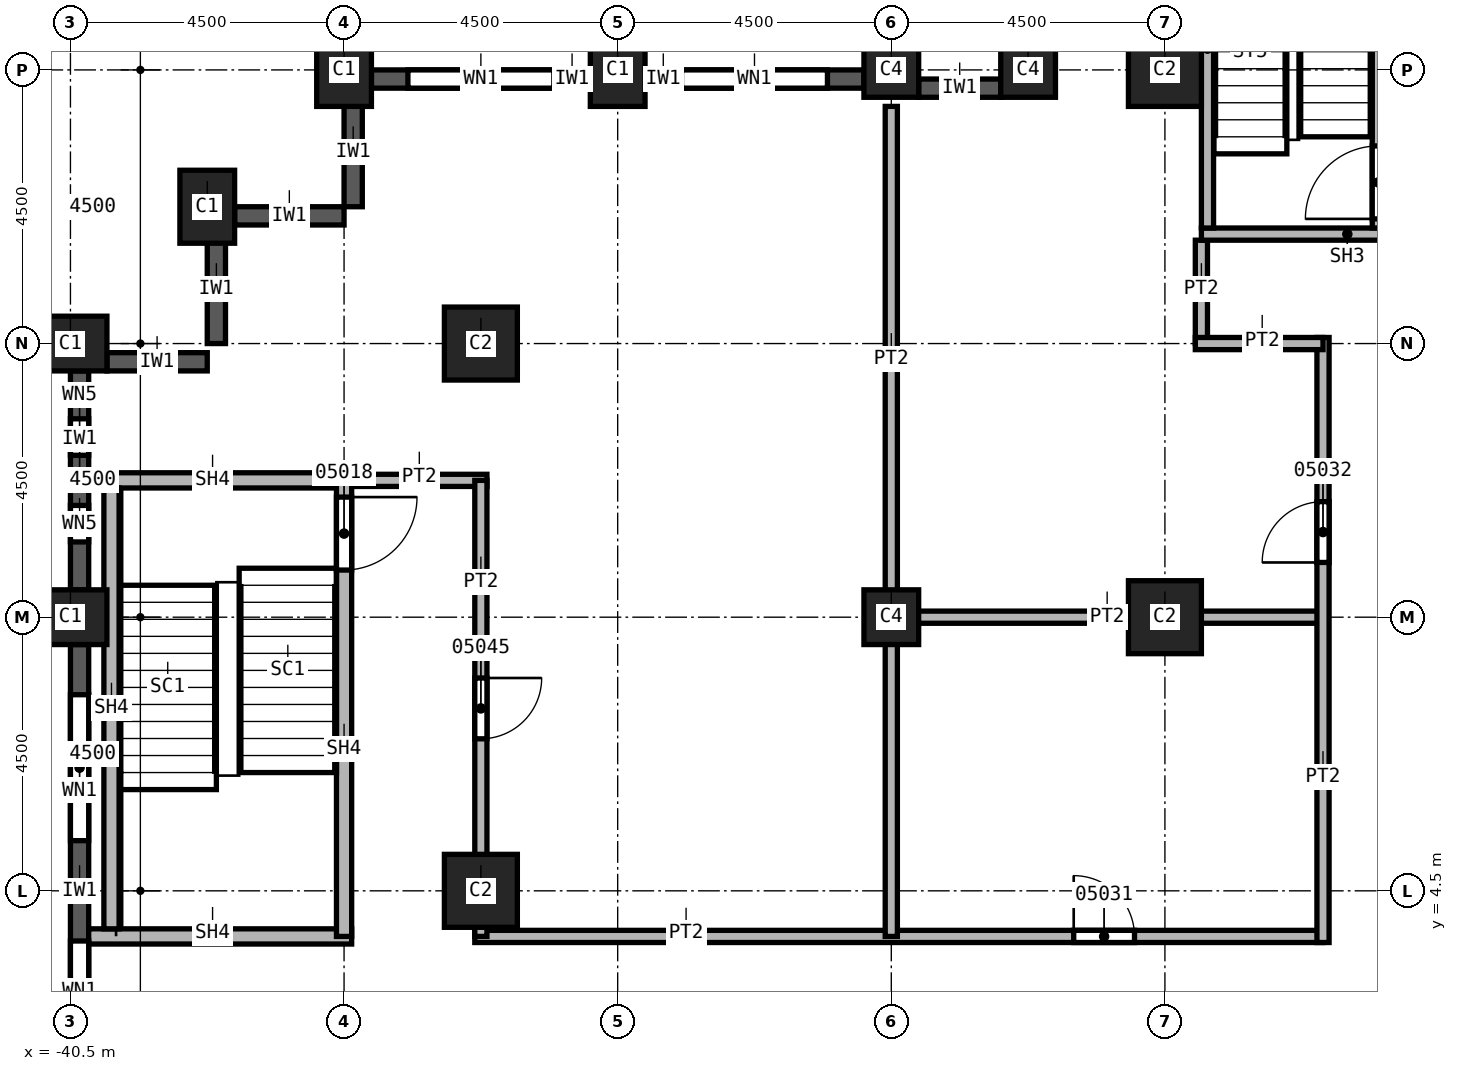
"""IFC4 building model, lengths in metres.
Left out: names, types, materials, properties, quantities, classifications, styles, units other than length and angle.
Written with IfcOpenShell. Run it as: python <this file> out.ifc"""

import sys

from ifc_helpers import new_model, si_unit, direction, frame, frame_2d, origin, origin_2d, place, context, subcontext, project, spatial, rectangle, extrude, element, fill, save


model = new_model("IFC4")
c1 = context("Model", 3, precision=1e-05, world=origin(), true_north=direction((0.0, 1.0)))
c2 = subcontext(c1, "Body", "Model", "MODEL_VIEW")
j1 = project(units=[si_unit("LENGTHUNIT", "METRE"), si_unit("PLANEANGLEUNIT", "RADIAN")], contexts=[c1])
p1 = place(None, origin())
s1 = spatial("IfcSite", under=j1, at=p1, CompositionType="ELEMENT")
p2 = place(p1, origin())
s2 = spatial("IfcBuilding", under=s1, at=p2, CompositionType="ELEMENT")
p3 = place(p2, frame((0.0, 0.0, 112.0)))
s3 = spatial("IfcBuildingStorey", under=s2, at=p3, CompositionType="ELEMENT", Elevation=112.0)
for number, where, z_axis, x_axis in (
    (1, (-40.5, 9.0, 0.0), (0.0, 0.0, 1.0), (0.0, 1.0, 0.0)),
    (2, (-40.5, 13.5, 0.0), (0.0, 0.0, 1.0), (0.0, 1.0, 0.0)),
    (3, (-38.25, 15.75, 0.0), (0.0, 0.0, 1.0), (1.0, 0.0, 0.0)),
    (4, (-31.5, 18.0, 0.0), (0.0, 0.0, 1.0), (1.0, 0.0, 0.0)),
    (5, (-36.0, 18.0, 0.0), (0.0, 0.0, 1.0), (1.0, 0.0, 0.0)),
):
    element("IfcColumn", number, at=place(p3, frame(where, z_axis=z_axis, x_axis=x_axis)), inside=s3, PredefinedType="COLUMN", context=c2, shape_type="SweptSolid", body=[
        extrude(rectangle(XDim=0.9, YDim=1.2, at=origin_2d()), origin(), (0.0, 0.0, 1.0), 3.7),
    ])
for number, where, z_axis, x_axis in (
    (6, (-33.75, 4.5, 0.0), (0.0, 0.0, 1.0), (1.0, 0.0, 0.0)),
    (7, (-33.75, 13.5, 0.0), (0.0, 0.0, 1.0), (1.0, 0.0, 0.0)),
    (8, (-22.5, 9.0, 0.0), (0.0, 0.0, 1.0), (1.0, 0.0, 0.0)),
    (9, (-22.5, 18.0, 0.0), (0.0, 0.0, 1.0), (1.0, 0.0, 0.0)),
):
    element("IfcColumn", number, at=place(p3, frame(where, z_axis=z_axis, x_axis=x_axis)), inside=s3, PredefinedType="COLUMN", context=c2, shape_type="SweptSolid", body=[
        extrude(rectangle(XDim=1.2, YDim=1.2, at=origin_2d()), origin(), (0.0, 0.0, 1.0), 3.7),
    ])
for number, where, z_axis, x_axis in (
    (10, (-27.0, 9.0, 0.0), (0.0, 0.0, 1.0), (1.0, 0.0, 0.0)),
    (11, (-27.0, 18.0, 0.0), (0.0, 0.0, 1.0), (1.0, 0.0, 0.0)),
    (12, (-24.75, 18.0, 0.0), (0.0, 0.0, 1.0), (1.0, 0.0, 0.0)),
):
    element("IfcColumn", number, at=place(p3, frame(where, z_axis=z_axis, x_axis=x_axis)), inside=s3, PredefinedType="COLUMN", context=c2, shape_type="SweptSolid", body=[
        extrude(rectangle(XDim=0.9, YDim=0.9, at=origin_2d()), origin(), (0.0, 0.0, 1.0), 3.7),
    ])
for number, where, z_axis, x_axis in (
    (13, (-35.85, 17.55, 0.0), (0.0, 0.0, 1.0), (0.0, -1.0, 0.0)),
    (14, (-37.8, 15.6, 0.0), (0.0, 0.0, 1.0), (1.0, 0.0, 0.0)),
    (15, (-38.1, 15.3, 0.0), (0.0, 0.0, 1.0), (0.0, -1.0, 0.0)),
):
    element("IfcWall", number, at=place(p3, frame(where, z_axis=z_axis, x_axis=x_axis)), inside=s3, PredefinedType="SOLIDWALL", context=c2, shape_type="SweptSolid", body=[
        extrude(rectangle(XDim=1.8, YDim=0.3, at=frame_2d((0.9, 0.0))), origin(), (0.0, 0.0, 1.0), 3.1),
    ])
p4 = place(p3, frame((-39.9, 13.2, 0.0), z_axis=(0.0, 0.0, 1.0), x_axis=(1.0, 0.0, 0.0)))
e16 = element("IfcWall", 16, at=p4, inside=s3, PredefinedType="SOLIDWALL", context=c2, shape_type="SweptSolid", body=[
    extrude(rectangle(XDim=1.65, YDim=0.3, at=frame_2d((0.825, 0.0))), origin(), (0.0, 0.0, 1.0), 3.1),
])
p5 = place(p3, frame((-25.2, 17.7, 0.0), z_axis=(0.0, 0.0, 1.0), x_axis=(-1.0, 0.0, 0.0)))
e17 = element("IfcWall", 17, at=p5, inside=s3, PredefinedType="SOLIDWALL", context=c2, shape_type="SweptSolid", body=[
    extrude(rectangle(XDim=1.35, YDim=0.3, at=frame_2d((0.675, 0.0))), origin(), (0.0, 0.0, 1.0), 3.1),
])
p6 = place(p3, frame((-27.45, 17.85, 0.0), z_axis=(0.0, 0.0, 1.0), x_axis=(-1.0, 0.0, 0.0)))
e18 = element("IfcWall", 18, at=p6, inside=s3, PredefinedType="SOLIDWALL", context=c2, shape_type="SweptSolid", body=[
    extrude(rectangle(XDim=3.6, YDim=0.3, at=frame_2d((1.8, 0.0))), origin(), (0.0, 0.0, 1.0), 3.1),
])
p7 = place(p6, frame((0.6, 0.0, 0.8)))
e19 = element("IfcOpeningElement", 19, at=p7, cuts=e18, PredefinedType="OPENING", context=c2, shape_type="SweptSolid", body=[
    extrude(rectangle(XDim=2.4, YDim=1.95, at=frame_2d((1.2, 0.975))), frame((0.0, 0.15, 0.0), z_axis=(0.0, -1.0, 0.0), x_axis=(1.0, 0.0, 0.0)), (0.0, 0.0, 1.0), 0.3),
])
p8 = place(p3, frame((-31.95, 17.85, 0.0), z_axis=(0.0, 0.0, 1.0), x_axis=(-1.0, 0.0, 0.0)))
e20 = element("IfcWall", 20, at=p8, inside=s3, PredefinedType="SOLIDWALL", context=c2, shape_type="SweptSolid", body=[
    extrude(rectangle(XDim=3.6, YDim=0.3, at=frame_2d((1.8, 0.0))), origin(), (0.0, 0.0, 1.0), 3.1),
])
p9 = place(p8, frame((0.6, 0.0, 0.8)))
e21 = element("IfcOpeningElement", 21, at=p9, cuts=e20, PredefinedType="OPENING", context=c2, shape_type="SweptSolid", body=[
    extrude(rectangle(XDim=2.4, YDim=1.95, at=frame_2d((1.2, 0.975))), frame((0.0, 0.15, 0.0), z_axis=(0.0, -1.0, 0.0), x_axis=(1.0, 0.0, 0.0)), (0.0, 0.0, 1.0), 0.3),
])
p10 = place(p3, frame((-40.35, 13.05, 0.0), z_axis=(0.0, 0.0, 1.0), x_axis=(0.0, -1.0, 0.0)))
e22 = element("IfcWall", 22, at=p10, inside=s3, PredefinedType="SOLIDWALL", context=c2, shape_type="SweptSolid", body=[
    extrude(rectangle(XDim=3.6, YDim=0.3, at=frame_2d((1.8, 0.0))), origin(), (0.0, 0.0, 1.0), 3.1),
])
p11 = place(p10, frame((0.788, 0.0, 0.8)))
e23 = element("IfcOpeningElement", 23, at=p11, cuts=e22, PredefinedType="OPENING", context=c2, shape_type="SweptSolid", body=[
    extrude(rectangle(XDim=0.6, YDim=1.95, at=frame_2d((0.3, 0.975))), frame((0.0, 0.15, 0.0), z_axis=(0.0, -1.0, 0.0), x_axis=(1.0, 0.0, 0.0)), (0.0, 0.0, 1.0), 0.3),
])
p12 = place(p10, frame((2.212, 0.0, 0.8)))
e24 = element("IfcOpeningElement", 24, at=p12, cuts=e22, PredefinedType="OPENING", context=c2, shape_type="SweptSolid", body=[
    extrude(rectangle(XDim=0.6, YDim=1.95, at=frame_2d((0.3, 0.975))), frame((0.0, 0.15, 0.0), z_axis=(0.0, -1.0, 0.0), x_axis=(1.0, 0.0, 0.0)), (0.0, 0.0, 1.0), 0.3),
])
p13 = place(p3, frame((-40.35, 8.55, 0.0), z_axis=(0.0, 0.0, 1.0), x_axis=(0.0, -1.0, 0.0)))
e25 = element("IfcWall", 25, at=p13, inside=s3, PredefinedType="SOLIDWALL", context=c2, shape_type="SweptSolid", body=[
    extrude(rectangle(XDim=8.1, YDim=0.3, at=frame_2d((4.05, 0.0))), origin(), (0.0, 0.0, 1.0), 3.1),
])
p14 = place(p13, frame((0.825, 0.0, 0.8)))
e26 = element("IfcOpeningElement", 26, at=p14, cuts=e25, PredefinedType="OPENING", context=c2, shape_type="SweptSolid", body=[
    extrude(rectangle(XDim=2.4, YDim=1.95, at=frame_2d((1.2, 0.975))), frame((0.0, 0.15, 0.0), z_axis=(0.0, -1.0, 0.0), x_axis=(1.0, 0.0, 0.0)), (0.0, 0.0, 1.0), 0.3),
])
p15 = place(p13, frame((4.875, 0.0, 0.8)))
e27 = element("IfcOpeningElement", 27, at=p15, cuts=e25, PredefinedType="OPENING", context=c2, shape_type="SweptSolid", body=[
    extrude(rectangle(XDim=2.4, YDim=1.95, at=frame_2d((1.2, 0.975))), frame((0.0, 0.15, 0.0), z_axis=(0.0, -1.0, 0.0), x_axis=(1.0, 0.0, 0.0)), (0.0, 0.0, 1.0), 0.3),
])
p16 = place(p3, frame((-36.0, 11.25, 0.0), z_axis=(0.0, 0.0, 1.0), x_axis=(1.0, 0.0, 0.0)))
e28 = element("IfcWall", 28, at=p16, inside=s3, PredefinedType="PARTITIONING", context=c2, shape_type="SweptSolid", body=[
    extrude(rectangle(XDim=2.35, YDim=0.2, at=frame_2d((1.175, 0.0))), origin(), (0.0, 0.0, 1.0), 3.7),
])
p17 = place(p3, frame((-33.85, 3.75, 0.0), z_axis=(0.0, 0.0, 1.0), x_axis=(1.0, 0.0, 0.0)))
e29 = element("IfcWall", 29, at=p17, inside=s3, PredefinedType="PARTITIONING", context=c2, shape_type="SweptSolid", body=[
    extrude(rectangle(XDim=13.95, YDim=0.2, at=frame_2d((6.975, 0.0))), origin(), (0.0, 0.0, 1.0), 3.7),
])
p18 = place(p17, frame((9.85, 0.0, 0.0)))
e30 = element("IfcOpeningElement", 30, at=p18, cuts=e29, PredefinedType="OPENING", context=c2, shape_type="SweptSolid", body=[
    extrude(rectangle(XDim=1.0, YDim=2.1, at=frame_2d((0.5, 1.05))), frame((0.0, 0.1, 0.0), z_axis=(0.0, -1.0, 0.0), x_axis=(1.0, 0.0, 0.0)), (0.0, 0.0, 1.0), 0.2),
])
p19 = place(p3, frame((-33.75, 11.25, 0.0), z_axis=(0.0, 0.0, 1.0), x_axis=(0.0, -1.0, 0.0)))
e31 = element("IfcWall", 31, at=p19, inside=s3, PredefinedType="PARTITIONING", context=c2, shape_type="SweptSolid", body=[
    extrude(rectangle(XDim=7.5, YDim=0.2, at=frame_2d((3.75, 0.0))), origin(), (0.0, 0.0, 1.0), 3.7),
])
p20 = place(p19, frame((3.25, 0.0, 0.0)))
e32 = element("IfcOpeningElement", 32, at=p20, cuts=e31, PredefinedType="OPENING", context=c2, shape_type="SweptSolid", body=[
    extrude(rectangle(XDim=1.0, YDim=2.1, at=frame_2d((0.5, 1.05))), frame((0.0, 0.1, 0.0), z_axis=(0.0, -1.0, 0.0), x_axis=(1.0, 0.0, 0.0)), (0.0, 0.0, 1.0), 0.2),
])
p21 = place(p3, frame((-27.1, 9.0, 0.0), z_axis=(0.0, 0.0, 1.0), x_axis=(1.0, 0.0, 0.0)))
e33 = element("IfcWall", 33, at=p21, inside=s3, PredefinedType="PARTITIONING", context=c2, shape_type="SweptSolid", body=[
    extrude(rectangle(XDim=7.2, YDim=0.2, at=frame_2d((3.6, 0.0))), origin(), (0.0, 0.0, 1.0), 3.7),
])
p22 = place(p3, frame((-27.0, 3.75, 0.0), z_axis=(0.0, 0.0, 1.0), x_axis=(0.0, 1.0, 0.0)))
e34 = element("IfcWall", 34, at=p22, inside=s3, PredefinedType="PARTITIONING", context=c2, shape_type="SweptSolid", body=[
    extrude(rectangle(XDim=13.65, YDim=0.2, at=frame_2d((6.825, 0.0))), origin(), (0.0, 0.0, 1.0), 3.7),
])
p23 = place(p3, frame((-21.9, 13.5, 0.0), z_axis=(0.0, 0.0, 1.0), x_axis=(0.0, 1.0, 0.0)))
e35 = element("IfcWall", 35, at=p23, inside=s3, PredefinedType="PARTITIONING", context=c2, shape_type="SweptSolid", body=[
    extrude(rectangle(XDim=1.7, YDim=0.2, at=frame_2d((0.85, 0.0))), origin(), (0.0, 0.0, 1.0), 3.7),
])
p24 = place(p3, frame((-19.9, 3.65, 0.0), z_axis=(0.0, 0.0, 1.0), x_axis=(0.0, 1.0, 0.0)))
e36 = element("IfcWall", 36, at=p24, inside=s3, PredefinedType="PARTITIONING", context=c2, shape_type="SweptSolid", body=[
    extrude(rectangle(XDim=9.95, YDim=0.2, at=frame_2d((4.975, 0.0))), origin(), (0.0, 0.0, 1.0), 3.7),
])
p25 = place(p24, frame((6.25, 0.0, 0.0)))
e37 = element("IfcOpeningElement", 37, at=p25, cuts=e36, PredefinedType="OPENING", context=c2, shape_type="SweptSolid", body=[
    extrude(rectangle(XDim=1.0, YDim=2.1, at=frame_2d((0.5, 1.05))), frame((0.0, 0.1, 0.0), z_axis=(0.0, -1.0, 0.0), x_axis=(1.0, 0.0, 0.0)), (0.0, 0.0, 1.0), 0.2),
])
p26 = place(p3, frame((-19.9, 13.5, 0.0), z_axis=(0.0, 0.0, 1.0), x_axis=(-1.0, 0.0, 0.0)))
e38 = element("IfcWall", 38, at=p26, inside=s3, PredefinedType="PARTITIONING", context=c2, shape_type="SweptSolid", body=[
    extrude(rectangle(XDim=2.1, YDim=0.2, at=frame_2d((1.05, 0.0))), origin(), (0.0, 0.0, 1.0), 3.7),
])
p27 = place(p3, frame((-40.2, 3.75, 0.0), z_axis=(0.0, 0.0, 1.0), x_axis=(1.0, 0.0, 0.0)))
e39 = element("IfcWall", 39, at=p27, inside=s3, PredefinedType="SOLIDWALL", context=c2, shape_type="SweptSolid", body=[
    extrude(rectangle(XDim=4.325, YDim=0.25, at=frame_2d((2.163, 0.0))), origin(), (0.0, 0.0, 1.0), 3.7),
])
p28 = place(p3, frame((-40.2, 11.25, 0.0), z_axis=(0.0, 0.0, 1.0), x_axis=(1.0, 0.0, 0.0)))
e40 = element("IfcWall", 40, at=p28, inside=s3, PredefinedType="SOLIDWALL", context=c2, shape_type="SweptSolid", body=[
    extrude(rectangle(XDim=4.2, YDim=0.25, at=frame_2d((2.1, 0.0))), origin(), (0.0, 0.0, 1.0), 3.7),
])
p29 = place(p3, frame((-36.0, 11.375, 0.0), z_axis=(0.0, 0.0, 1.0), x_axis=(0.0, -1.0, 0.0)))
e41 = element("IfcWall", 41, at=p29, inside=s3, PredefinedType="SOLIDWALL", context=c2, shape_type="SweptSolid", body=[
    extrude(rectangle(XDim=7.625, YDim=0.25, at=frame_2d((3.812, 0.0))), origin(), (0.0, 0.0, 1.0), 3.7),
])
p30 = place(p29, frame((0.4, 0.0, 0.0)))
e42 = element("IfcOpeningElement", 42, at=p30, cuts=e41, PredefinedType="OPENING", context=c2, shape_type="SweptSolid", body=[
    extrude(rectangle(XDim=1.2, YDim=2.1, at=frame_2d((0.6, 1.05))), frame((0.0, 0.125, 0.0), z_axis=(0.0, -1.0, 0.0), x_axis=(1.0, 0.0, 0.0)), (0.0, 0.0, 1.0), 0.25),
])
p31 = place(p3, frame((-21.9, 15.3, 0.0), z_axis=(0.0, 0.0, 1.0), x_axis=(1.0, 0.0, 0.0)))
e43 = element("IfcWall", 43, at=p31, inside=s3, PredefinedType="SOLIDWALL", context=c2, shape_type="SweptSolid", body=[
    extrude(rectangle(XDim=8.275, YDim=0.2, at=frame_2d((4.137, 0.0))), origin(), (0.0, 0.0, 1.0), 3.7),
])
p32 = place(p31, frame((4.8, 0.0, 0.0)))
e44 = element("IfcOpeningElement", 44, at=p32, cuts=e43, PredefinedType="OPENING", context=c2, shape_type="SweptSolid", body=[
    extrude(rectangle(XDim=1.2, YDim=2.1, at=frame_2d((0.6, 1.05))), frame((0.0, 0.1, 0.0), z_axis=(0.0, -1.0, 0.0), x_axis=(1.0, 0.0, 0.0)), (0.0, 0.0, 1.0), 0.2),
])
p33 = place(p3, frame((-21.8, 15.4, 0.0), z_axis=(0.0, 0.0, 1.0), x_axis=(0.0, 1.0, 0.0)))
e45 = element("IfcWall", 45, at=p33, inside=s3, PredefinedType="SOLIDWALL", context=c2, shape_type="SweptSolid", body=[
    extrude(rectangle(XDim=5.9, YDim=0.2, at=frame_2d((2.95, 0.0))), origin(), (0.0, 0.0, 1.0), 3.7),
])
p34 = place(p3, frame((-18.99, 15.4, 0.0), z_axis=(0.0, 0.0, 1.0), x_axis=(0.0, 1.0, 0.0)))
e46 = element("IfcWall", 46, at=p34, inside=s3, PredefinedType="SOLIDWALL", context=c2, shape_type="SweptSolid", body=[
    extrude(rectangle(XDim=5.9, YDim=0.2, at=frame_2d((2.95, 0.0))), origin(), (0.0, 0.0, 1.0), 3.7),
])
p35 = place(p34, frame((0.15, 0.0, 0.0)))
e47 = element("IfcOpeningElement", 47, at=p35, cuts=e46, PredefinedType="OPENING", context=c2, shape_type="SweptSolid", body=[
    extrude(rectangle(XDim=1.2, YDim=2.1, at=frame_2d((0.6, 1.05))), frame((0.0, 0.1, 0.0), z_axis=(0.0, -1.0, 0.0), x_axis=(1.0, 0.0, 0.0)), (0.0, 0.0, 1.0), 0.2),
])
p36 = place(p3, frame((-39.825, 3.875, 0.0), z_axis=(0.0, 0.0, 1.0), x_axis=(0.0, 1.0, 0.0)))
e48 = element("IfcWall", 48, at=p36, inside=s3, PredefinedType="SOLIDWALL", context=c2, shape_type="SweptSolid", body=[
    extrude(rectangle(XDim=7.25, YDim=0.25, at=frame_2d((3.625, 0.0))), origin(), (0.0, 0.0, 1.0), 3.7),
])
p37 = place(p7, origin())
e49 = element("IfcWindow", 49, at=p37, inside=s3, PartitioningType="SINGLE_PANEL", PredefinedType="WINDOW", context=c2, shape_type="SweptSolid", body=[
    extrude(rectangle(XDim=2.4, YDim=1.95, at=frame_2d((1.2, 0.975))), frame((0.0, 0.03, 0.0), z_axis=(0.0, -1.0, 0.0), x_axis=(1.0, 0.0, 0.0)), (0.0, 0.0, 1.0), 0.06),
])
fill(e19, e49)
p38 = place(p9, origin())
e50 = element("IfcWindow", 50, at=p38, inside=s3, PartitioningType="SINGLE_PANEL", PredefinedType="WINDOW", context=c2, shape_type="SweptSolid", body=[
    extrude(rectangle(XDim=2.4, YDim=1.95, at=frame_2d((1.2, 0.975))), frame((0.0, 0.03, 0.0), z_axis=(0.0, -1.0, 0.0), x_axis=(1.0, 0.0, 0.0)), (0.0, 0.0, 1.0), 0.06),
])
fill(e21, e50)
p39 = place(p14, origin())
e51 = element("IfcWindow", 51, at=p39, inside=s3, PartitioningType="SINGLE_PANEL", PredefinedType="WINDOW", context=c2, shape_type="SweptSolid", body=[
    extrude(rectangle(XDim=2.4, YDim=1.95, at=frame_2d((1.2, 0.975))), frame((0.0, 0.03, 0.0), z_axis=(0.0, -1.0, 0.0), x_axis=(1.0, 0.0, 0.0)), (0.0, 0.0, 1.0), 0.06),
])
fill(e26, e51)
p40 = place(p15, origin())
e52 = element("IfcWindow", 52, at=p40, inside=s3, PartitioningType="SINGLE_PANEL", PredefinedType="WINDOW", context=c2, shape_type="SweptSolid", body=[
    extrude(rectangle(XDim=2.4, YDim=1.95, at=frame_2d((1.2, 0.975))), frame((0.0, 0.03, 0.0), z_axis=(0.0, -1.0, 0.0), x_axis=(1.0, 0.0, 0.0)), (0.0, 0.0, 1.0), 0.06),
])
fill(e27, e52)
p41 = place(p30, origin())
e53 = element("IfcDoor", 53, at=p41, inside=s3, OperationType="SINGLE_SWING_LEFT", PredefinedType="DOOR", context=c2, shape_type="SweptSolid", body=[
    extrude(rectangle(XDim=1.2, YDim=2.1, at=frame_2d((0.6, 1.05))), frame((0.0, 0.025, 0.0), z_axis=(0.0, -1.0, 0.0), x_axis=(1.0, 0.0, 0.0)), (0.0, 0.0, 1.0), 0.05),
])
fill(e42, e53)
p42 = place(p18, origin())
e54 = element("IfcDoor", 54, at=p42, inside=s3, OperationType="SINGLE_SWING_RIGHT", PredefinedType="DOOR", context=c2, shape_type="SweptSolid", body=[
    extrude(rectangle(XDim=1.0, YDim=2.1, at=frame_2d((0.5, 1.05))), frame((0.0, 0.025, 0.0), z_axis=(0.0, -1.0, 0.0), x_axis=(1.0, 0.0, 0.0)), (0.0, 0.0, 1.0), 0.05),
])
fill(e30, e54)
p43 = place(p25, origin())
e55 = element("IfcDoor", 55, at=p43, inside=s3, OperationType="SINGLE_SWING_LEFT", PredefinedType="DOOR", context=c2, shape_type="SweptSolid", body=[
    extrude(rectangle(XDim=1.0, YDim=2.1, at=frame_2d((0.5, 1.05))), frame((0.0, 0.025, 0.0), z_axis=(0.0, -1.0, 0.0), x_axis=(1.0, 0.0, 0.0)), (0.0, 0.0, 1.0), 0.05),
])
fill(e37, e55)
p44 = place(p20, origin())
e56 = element("IfcDoor", 56, at=p44, inside=s3, OperationType="SINGLE_SWING_RIGHT", PredefinedType="DOOR", context=c2, shape_type="SweptSolid", body=[
    extrude(rectangle(XDim=1.0, YDim=2.1, at=frame_2d((0.5, 1.05))), frame((0.0, 0.025, 0.0), z_axis=(0.0, -1.0, 0.0), x_axis=(1.0, 0.0, 0.0)), (0.0, 0.0, 1.0), 0.05),
])
fill(e32, e56)
p45 = place(p35, origin())
e57 = element("IfcDoor", 57, at=p45, inside=s3, OperationType="SINGLE_SWING_LEFT", PredefinedType="DOOR", context=c2, shape_type="SweptSolid", body=[
    extrude(rectangle(XDim=1.2, YDim=2.1, at=frame_2d((0.6, 1.05))), frame((0.0, 0.025, 0.0), z_axis=(0.0, -1.0, 0.0), x_axis=(1.0, 0.0, 0.0)), (0.0, 0.0, 1.0), 0.05),
])
fill(e47, e57)
p46 = place(p11, origin())
e58 = element("IfcWindow", 58, at=p46, inside=s3, PartitioningType="SINGLE_PANEL", PredefinedType="WINDOW", context=c2, shape_type="SweptSolid", body=[
    extrude(rectangle(XDim=0.6, YDim=1.95, at=frame_2d((0.3, 0.975))), frame((0.0, 0.03, 0.0), z_axis=(0.0, -1.0, 0.0), x_axis=(1.0, 0.0, 0.0)), (0.0, 0.0, 1.0), 0.06),
])
fill(e23, e58)
p47 = place(p12, origin())
e59 = element("IfcWindow", 59, at=p47, inside=s3, PartitioningType="SINGLE_PANEL", PredefinedType="WINDOW", context=c2, shape_type="SweptSolid", body=[
    extrude(rectangle(XDim=0.6, YDim=1.95, at=frame_2d((0.3, 0.975))), frame((0.0, 0.03, 0.0), z_axis=(0.0, -1.0, 0.0), x_axis=(1.0, 0.0, 0.0)), (0.0, 0.0, 1.0), 0.06),
])
fill(e24, e59)
save(model, sys.argv[1])
